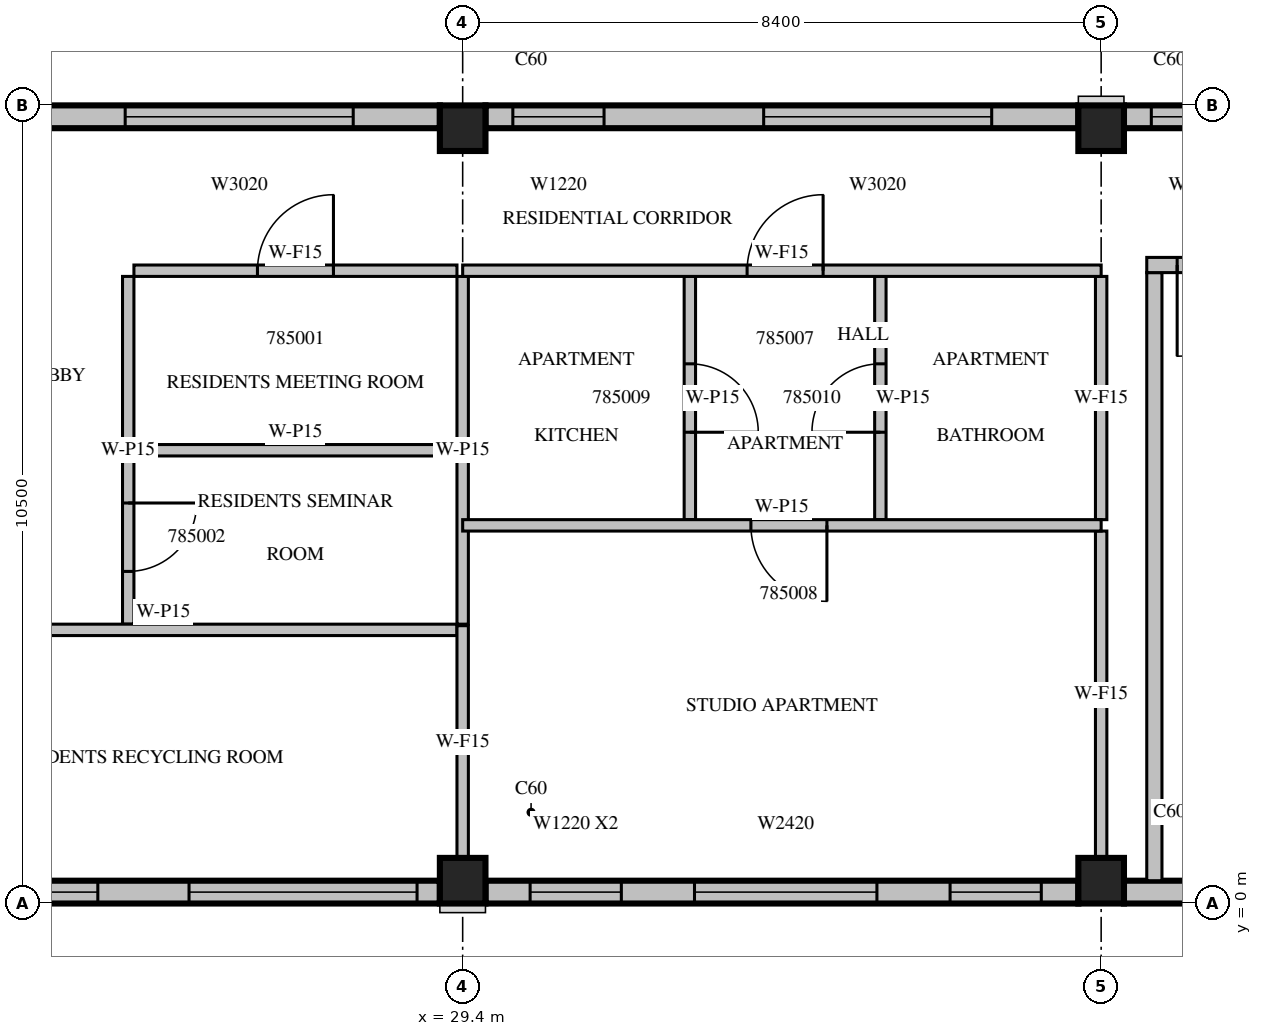
"""IFC4 building model, lengths in metres.
Left out: names, types, materials, properties, quantities, classifications, styles, units other than length and angle.
Written with IfcOpenShell. Run it as: python <this file> out.ifc"""

import sys

from ifc_helpers import new_model, si_unit, direction, frame, frame_2d, origin, origin_2d, place, context, subcontext, project, spatial, rectangle, extrude, source, transform, mapped, element, fill, save


model = new_model("IFC4")
c1 = context("Model", 3, precision=1e-05, world=origin(), true_north=direction((0.0, 1.0)))
c2 = subcontext(c1, "Body", "Model", "MODEL_VIEW")
j1 = project(units=[si_unit("LENGTHUNIT", "METRE"), si_unit("PLANEANGLEUNIT", "RADIAN")], contexts=[c1])
p1 = place(None, origin())
s1 = spatial("IfcSite", under=j1, at=p1, CompositionType="ELEMENT")
p2 = place(p1, origin())
s2 = spatial("IfcBuilding", under=s1, at=p2, CompositionType="ELEMENT")
p3 = place(p2, frame((0.0, 0.0, 358.0)))
s3 = spatial("IfcBuildingStorey", under=s2, at=p3, CompositionType="ELEMENT", Elevation=358.0)
m1 = source(origin(), c2, "Body", "SweptSolid", [
    extrude(rectangle(XDim=0.6, YDim=0.6, at=origin_2d()), origin(), (0.0, 0.0, 1.0), 3.5),
])
for number, where, z_axis, x_axis in (
    (1, (29.4, 0.3, 0.0), (0.0, 0.0, 1.0), (1.0, 0.0, 0.0)),
    (2, (37.8, 0.3, 0.0), (0.0, 0.0, 1.0), (1.0, 0.0, 0.0)),
    (3, (29.4, 10.2, 0.0), (0.0, 0.0, 1.0), (1.0, 0.0, 0.0)),
    (4, (37.8, 10.2, 0.0), (0.0, 0.0, 1.0), (1.0, 0.0, 0.0)),
):
    element("IfcColumn", number, at=place(p3, frame(where, z_axis=z_axis, x_axis=x_axis)), inside=s3, PredefinedType="COLUMN", context=c2, shape_type="MappedRepresentation", body=[
        mapped(m1, transform((0.0, 0.0, 0.0), scale=1.0)),
    ])
m2 = source(origin(), c2, "Body", "SweptSolid", [
    extrude(rectangle(XDim=7.8, YDim=0.3, at=frame_2d((3.9, 0.0))), origin(), (0.0, 0.0, 1.0), 3.1),
])
p4 = place(p3, frame((21.3, 0.15, 0.0), z_axis=(0.0, 0.0, 1.0), x_axis=(1.0, 0.0, 0.0)))
e5 = element("IfcWall", 5, at=p4, inside=s3, PredefinedType="STANDARD", context=c2, shape_type="MappedRepresentation", body=[
    mapped(m2, transform((0.0, 0.0, 0.0), scale=1.0)),
])
m3 = source(origin(), c2, "Body", "SweptSolid", [
    extrude(rectangle(XDim=3.0, YDim=2.0, at=frame_2d((1.5, 1.0))), frame((0.0, 0.16, 0.0), z_axis=(0.0, -1.0, 0.0), x_axis=(1.0, 0.0, 0.0)), (0.0, 0.0, 1.0), 0.32),
])
p5 = place(p4, frame((0.3, 0.0, 0.6)))
e6 = element("IfcOpeningElement", 6, at=p5, cuts=e5, PredefinedType="OPENING", context=c2, shape_type="MappedRepresentation", body=[
    mapped(m3, transform((0.0, 0.0, 0.0), scale=1.0)),
])
p6 = place(p4, frame((4.5, 0.0, 0.6)))
e7 = element("IfcOpeningElement", 7, at=p6, cuts=e5, PredefinedType="OPENING", context=c2, shape_type="MappedRepresentation", body=[
    mapped(m3, transform((0.0, 0.0, 0.0), scale=1.0)),
])
p7 = place(p3, frame((29.7, 0.15, 0.0), z_axis=(0.0, 0.0, 1.0), x_axis=(1.0, 0.0, 0.0)))
e8 = element("IfcWall", 8, at=p7, inside=s3, PredefinedType="STANDARD", context=c2, shape_type="MappedRepresentation", body=[
    mapped(m2, transform((0.0, 0.0, 0.0), scale=1.0)),
])
m4 = source(origin(), c2, "Body", "SweptSolid", [
    extrude(rectangle(XDim=1.2, YDim=2.0, at=frame_2d((0.6, 1.0))), frame((0.0, 0.16, 0.0), z_axis=(0.0, -1.0, 0.0), x_axis=(1.0, 0.0, 0.0)), (0.0, 0.0, 1.0), 0.32),
])
p8 = place(p7, frame((0.588, 0.0, 0.6)))
e9 = element("IfcOpeningElement", 9, at=p8, cuts=e8, PredefinedType="OPENING", context=c2, shape_type="MappedRepresentation", body=[
    mapped(m4, transform((0.0, 0.0, 0.0), scale=1.0)),
])
p9 = place(p7, frame((6.112, 0.0, 0.6)))
e10 = element("IfcOpeningElement", 10, at=p9, cuts=e8, PredefinedType="OPENING", context=c2, shape_type="MappedRepresentation", body=[
    mapped(m4, transform((0.0, 0.0, 0.0), scale=1.0)),
])
m5 = source(origin(), c2, "Body", "SweptSolid", [
    extrude(rectangle(XDim=2.4, YDim=2.0, at=frame_2d((1.2, 1.0))), frame((0.0, 0.16, 0.0), z_axis=(0.0, -1.0, 0.0), x_axis=(1.0, 0.0, 0.0)), (0.0, 0.0, 1.0), 0.32),
])
p10 = place(p7, frame((2.75, 0.0, 0.6)))
e11 = element("IfcOpeningElement", 11, at=p10, cuts=e8, PredefinedType="OPENING", context=c2, shape_type="MappedRepresentation", body=[
    mapped(m5, transform((0.0, 0.0, 0.0), scale=1.0)),
])
m6 = source(origin(), c2, "Body", "SweptSolid", [
    extrude(rectangle(XDim=2.1, YDim=0.3, at=frame_2d((1.05, 0.0))), origin(), (0.0, 0.0, 1.0), 3.1),
])
p11 = place(p3, frame((38.1, 0.15, 0.0), z_axis=(0.0, 0.0, 1.0), x_axis=(1.0, 0.0, 0.0)))
e12 = element("IfcWall", 12, at=p11, inside=s3, PredefinedType="STANDARD", context=c2, shape_type="MappedRepresentation", body=[
    mapped(m6, transform((0.0, 0.0, 0.0), scale=1.0)),
])
p12 = place(p3, frame((45.9, 10.35, 0.0), z_axis=(0.0, 0.0, 1.0), x_axis=(-1.0, 0.0, 0.0)))
e13 = element("IfcWall", 13, at=p12, inside=s3, PredefinedType="STANDARD", context=c2, shape_type="MappedRepresentation", body=[
    mapped(m2, transform((0.0, 0.0, 0.0), scale=1.0)),
])
p13 = place(p12, frame((1.14, 0.0, 0.6)))
e14 = element("IfcOpeningElement", 14, at=p13, cuts=e13, PredefinedType="OPENING", context=c2, shape_type="MappedRepresentation", body=[
    mapped(m3, transform((0.0, 0.0, 0.0), scale=1.0)),
])
p14 = place(p12, frame((6.24, 0.0, 0.6)))
e15 = element("IfcOpeningElement", 15, at=p14, cuts=e13, PredefinedType="OPENING", context=c2, shape_type="MappedRepresentation", body=[
    mapped(m4, transform((0.0, 0.0, 0.0), scale=1.0)),
])
p15 = place(p3, frame((37.5, 10.35, 0.0), z_axis=(0.0, 0.0, 1.0), x_axis=(-1.0, 0.0, 0.0)))
e16 = element("IfcWall", 16, at=p15, inside=s3, PredefinedType="STANDARD", context=c2, shape_type="MappedRepresentation", body=[
    mapped(m2, transform((0.0, 0.0, 0.0), scale=1.0)),
])
p16 = place(p15, frame((1.14, 0.0, 0.6)))
e17 = element("IfcOpeningElement", 17, at=p16, cuts=e16, PredefinedType="OPENING", context=c2, shape_type="MappedRepresentation", body=[
    mapped(m3, transform((0.0, 0.0, 0.0), scale=1.0)),
])
p17 = place(p15, frame((6.24, 0.0, 0.6)))
e18 = element("IfcOpeningElement", 18, at=p17, cuts=e16, PredefinedType="OPENING", context=c2, shape_type="MappedRepresentation", body=[
    mapped(m4, transform((0.0, 0.0, 0.0), scale=1.0)),
])
m7 = source(origin(), c2, "Body", "SweptSolid", [
    extrude(rectangle(XDim=7.5, YDim=0.3, at=frame_2d((3.75, 0.0))), origin(), (0.0, 0.0, 1.0), 3.1),
])
p18 = place(p3, frame((29.1, 10.35, 0.0), z_axis=(0.0, 0.0, 1.0), x_axis=(-1.0, 0.0, 0.0)))
e19 = element("IfcWall", 19, at=p18, inside=s3, PredefinedType="STANDARD", context=c2, shape_type="MappedRepresentation", body=[
    mapped(m7, transform((0.0, 0.0, 0.0), scale=1.0)),
])
p19 = place(p18, frame((1.14, 0.0, 0.6)))
e20 = element("IfcOpeningElement", 20, at=p19, cuts=e19, PredefinedType="OPENING", context=c2, shape_type="MappedRepresentation", body=[
    mapped(m3, transform((0.0, 0.0, 0.0), scale=1.0)),
])
m8 = source(origin(), c2, "Body", "SweptSolid", [
    extrude(rectangle(XDim=1.8, YDim=2.0, at=frame_2d((0.9, 1.0))), frame((0.0, 0.16, 0.0), z_axis=(0.0, -1.0, 0.0), x_axis=(1.0, 0.0, 0.0)), (0.0, 0.0, 1.0), 0.32),
])
p20 = place(p18, frame((5.52, 0.0, 0.6)))
e21 = element("IfcOpeningElement", 21, at=p20, cuts=e19, PredefinedType="OPENING", context=c2, shape_type="MappedRepresentation", body=[
    mapped(m8, transform((0.0, 0.0, 0.0), scale=1.0)),
])
m9 = source(origin(), c2, "Body", "SweptSolid", [
    extrude(rectangle(XDim=8.0, YDim=0.2, at=frame_2d((4.0, 0.0))), origin(), (0.0, 0.0, 1.0), 3.1),
])
p21 = place(p3, frame((38.5, 0.3, 0.0), z_axis=(0.0, 0.0, 1.0), x_axis=(0.0, 1.0, 0.0)))
e22 = element("IfcWall", 22, at=p21, inside=s3, PredefinedType="PARTITIONING", context=c2, shape_type="MappedRepresentation", body=[
    mapped(m9, transform((0.0, 0.0, 0.0), scale=1.0)),
])
m10 = source(origin(), c2, "Body", "SweptSolid", [
    extrude(rectangle(XDim=5.45, YDim=0.2, at=frame_2d((2.725, 0.0))), origin(), (0.0, 0.0, 1.0), 3.1),
])
p22 = place(p3, frame((38.4, 8.4, 0.0), z_axis=(0.0, 0.0, 1.0), x_axis=(1.0, 0.0, 0.0)))
e23 = element("IfcWall", 23, at=p22, inside=s3, PredefinedType="PARTITIONING", context=c2, shape_type="MappedRepresentation", body=[
    mapped(m10, transform((0.0, 0.0, 0.0), scale=1.0)),
])
m11 = source(origin(), c2, "Body", "SweptSolid", [
    extrude(rectangle(XDim=1.2, YDim=2.1, at=frame_2d((0.6, 1.05))), frame((0.0, 0.11, 0.0), z_axis=(0.0, -1.0, 0.0), x_axis=(1.0, 0.0, 0.0)), (0.0, 0.0, 1.0), 0.22),
])
p23 = place(p22, frame((0.4, 0.0, 0.0)))
e24 = element("IfcOpeningElement", 24, at=p23, cuts=e23, PredefinedType="OPENING", context=c2, shape_type="MappedRepresentation", body=[
    mapped(m11, transform((0.0, 0.0, 0.0), scale=1.0)),
])
m12 = source(origin(), c2, "Body", "SweptSolid", [
    extrude(rectangle(XDim=0.9, YDim=2.1, at=frame_2d((0.45, 1.05))), frame((0.0, 0.11, 0.0), z_axis=(0.0, -1.0, 0.0), x_axis=(1.0, 0.0, 0.0)), (0.0, 0.0, 1.0), 0.22),
])
p24 = place(p22, frame((3.25, 0.0, 0.0)))
e25 = element("IfcOpeningElement", 25, at=p24, cuts=e23, PredefinedType="OPENING", context=c2, shape_type="MappedRepresentation", body=[
    mapped(m12, transform((0.0, 0.0, 0.0), scale=1.0)),
])
m13 = source(origin(), c2, "Body", "SweptSolid", [
    extrude(rectangle(XDim=4.575, YDim=0.15, at=frame_2d((2.288, 0.0))), origin(), (0.0, 0.0, 1.0), 3.1),
])
p25 = place(p3, frame((25.0, 8.25, 0.0), z_axis=(0.0, 0.0, 1.0), x_axis=(0.0, -1.0, 0.0)))
e26 = element("IfcWall", 26, at=p25, inside=s3, PredefinedType="PARTITIONING", context=c2, shape_type="MappedRepresentation", body=[
    mapped(m13, transform((0.0, 0.0, 0.0), scale=1.0)),
])
m14 = source(origin(), c2, "Body", "SweptSolid", [
    extrude(rectangle(XDim=0.9, YDim=2.1, at=frame_2d((0.45, 1.05))), frame((0.0, 0.085, 0.0), z_axis=(0.0, -1.0, 0.0), x_axis=(1.0, 0.0, 0.0)), (0.0, 0.0, 1.0), 0.17),
])
p26 = place(p25, frame((2.981, 0.0, 0.0)))
e27 = element("IfcOpeningElement", 27, at=p26, cuts=e26, PredefinedType="OPENING", context=c2, shape_type="MappedRepresentation", body=[
    mapped(m14, transform((0.0, 0.0, 0.0), scale=1.0)),
])
p27 = place(p3, frame((29.4, 3.675, 0.0), z_axis=(0.0, 0.0, 1.0), x_axis=(0.0, 1.0, 0.0)))
e28 = element("IfcWall", 28, at=p27, inside=s3, PredefinedType="PARTITIONING", context=c2, shape_type="MappedRepresentation", body=[
    mapped(m13, transform((0.0, 0.0, 0.0), scale=1.0)),
])
m15 = source(origin(), c2, "Body", "SweptSolid", [
    extrude(rectangle(XDim=4.25, YDim=0.15, at=frame_2d((2.125, 0.0))), origin(), (0.0, 0.0, 1.0), 3.1),
])
p28 = place(p3, frame((29.325, 8.325, 0.0), z_axis=(0.0, 0.0, 1.0), x_axis=(-1.0, 0.0, 0.0)))
e29 = element("IfcWall", 29, at=p28, inside=s3, PredefinedType="PARTITIONING", context=c2, shape_type="MappedRepresentation", body=[
    mapped(m15, transform((0.0, 0.0, 0.0), scale=1.0)),
])
m16 = source(origin(), c2, "Body", "SweptSolid", [
    extrude(rectangle(XDim=1.0, YDim=2.1, at=frame_2d((0.5, 1.05))), frame((0.0, 0.085, 0.0), z_axis=(0.0, -1.0, 0.0), x_axis=(1.0, 0.0, 0.0)), (0.0, 0.0, 1.0), 0.17),
])
p29 = place(p28, frame((1.625, 0.0, 0.0)))
e30 = element("IfcOpeningElement", 30, at=p29, cuts=e29, PredefinedType="OPENING", context=c2, shape_type="MappedRepresentation", body=[
    mapped(m16, transform((0.0, 0.0, 0.0), scale=1.0)),
])
p30 = place(p3, frame((29.325, 5.963, 0.0), z_axis=(0.0, 0.0, 1.0), x_axis=(-1.0, 0.0, 0.0)))
e31 = element("IfcWall", 31, at=p30, inside=s3, PredefinedType="PARTITIONING", context=c2, shape_type="MappedRepresentation", body=[
    mapped(m15, transform((0.0, 0.0, 0.0), scale=1.0)),
])
m17 = source(origin(), c2, "Body", "SweptSolid", [
    extrude(rectangle(XDim=7.725, YDim=0.15, at=frame_2d((3.862, 0.0))), origin(), (0.0, 0.0, 1.0), 3.1),
])
p31 = place(p3, frame((21.6, 3.6, 0.0), z_axis=(0.0, 0.0, 1.0), x_axis=(1.0, 0.0, 0.0)))
e32 = element("IfcWall", 32, at=p31, inside=s3, PredefinedType="PARTITIONING", context=c2, shape_type="MappedRepresentation", body=[
    mapped(m17, transform((0.0, 0.0, 0.0), scale=1.0)),
])
m18 = source(origin(), c2, "Body", "SweptSolid", [
    extrude(rectangle(XDim=1.2, YDim=2.1, at=frame_2d((0.6, 1.05))), frame((0.0, 0.085, 0.0), z_axis=(0.0, -1.0, 0.0), x_axis=(1.0, 0.0, 0.0)), (0.0, 0.0, 1.0), 0.17),
])
p32 = place(p31, frame((1.1, 0.0, 0.0)))
e33 = element("IfcOpeningElement", 33, at=p32, cuts=e32, PredefinedType="OPENING", context=c2, shape_type="MappedRepresentation", body=[
    mapped(m18, transform((0.0, 0.0, 0.0), scale=1.0)),
])
m19 = source(origin(), c2, "Body", "SweptSolid", [
    extrude(rectangle(XDim=3.2, YDim=0.15, at=frame_2d((1.6, 0.0))), origin(), (0.0, 0.0, 1.0), 3.1),
])
p33 = place(p3, frame((32.389, 5.05, 0.0), z_axis=(0.0, 0.0, 1.0), x_axis=(0.0, 1.0, 0.0)))
e34 = element("IfcWall", 34, at=p33, inside=s3, PredefinedType="PARTITIONING", context=c2, shape_type="MappedRepresentation", body=[
    mapped(m19, transform((0.0, 0.0, 0.0), scale=1.0)),
])
p34 = place(p33, frame((1.15, 0.0, 0.0)))
e35 = element("IfcOpeningElement", 35, at=p34, cuts=e34, PredefinedType="OPENING", context=c2, shape_type="MappedRepresentation", body=[
    mapped(m14, transform((0.0, 0.0, 0.0), scale=1.0)),
])
p35 = place(p3, frame((34.895, 5.05, 0.0), z_axis=(0.0, 0.0, 1.0), x_axis=(0.0, 1.0, 0.0)))
e36 = element("IfcWall", 36, at=p35, inside=s3, PredefinedType="PARTITIONING", context=c2, shape_type="MappedRepresentation", body=[
    mapped(m19, transform((0.0, 0.0, 0.0), scale=1.0)),
])
p36 = place(p35, frame((1.15, 0.0, 0.0)))
e37 = element("IfcOpeningElement", 37, at=p36, cuts=e36, PredefinedType="OPENING", context=c2, shape_type="MappedRepresentation", body=[
    mapped(m14, transform((0.0, 0.0, 0.0), scale=1.0)),
])
m20 = source(origin(), c2, "Body", "SweptSolid", [
    extrude(rectangle(XDim=3.056, YDim=0.15, at=frame_2d((1.528, 0.0))), origin(), (0.0, 0.0, 1.0), 3.1),
])
p37 = place(p3, frame((29.4, 0.599, 0.0), z_axis=(0.0, 0.0, 1.0), x_axis=(0.0, 1.0, 0.0)))
e38 = element("IfcWall", 38, at=p37, inside=s3, PredefinedType="PARTITIONING", context=c2, shape_type="MappedRepresentation", body=[
    mapped(m20, transform((0.0, 0.0, 0.0), scale=1.0)),
])
m21 = source(origin(), c2, "Body", "SweptSolid", [
    extrude(rectangle(XDim=4.301, YDim=0.15, at=frame_2d((2.151, 0.0))), origin(), (0.0, 0.0, 1.0), 3.1),
])
p38 = place(p3, frame((37.8, 0.599, 0.0), z_axis=(0.0, 0.0, 1.0), x_axis=(0.0, 1.0, 0.0)))
e39 = element("IfcWall", 39, at=p38, inside=s3, PredefinedType="PARTITIONING", context=c2, shape_type="MappedRepresentation", body=[
    mapped(m21, transform((0.0, 0.0, 0.0), scale=1.0)),
])
p39 = place(p3, frame((37.8, 5.05, 0.0), z_axis=(0.0, 0.0, 1.0), x_axis=(0.0, 1.0, 0.0)))
e40 = element("IfcWall", 40, at=p39, inside=s3, PredefinedType="PARTITIONING", context=c2, shape_type="MappedRepresentation", body=[
    mapped(m19, transform((0.0, 0.0, 0.0), scale=1.0)),
])
m22 = source(origin(), c2, "Body", "SweptSolid", [
    extrude(rectangle(XDim=8.4, YDim=0.15, at=frame_2d((4.2, 0.0))), origin(), (0.0, 0.0, 1.0), 3.1),
])
p40 = place(p3, frame((37.8, 4.975, 0.0), z_axis=(0.0, 0.0, 1.0), x_axis=(-1.0, 0.0, 0.0)))
e41 = element("IfcWall", 41, at=p40, inside=s3, PredefinedType="PARTITIONING", context=c2, shape_type="MappedRepresentation", body=[
    mapped(m22, transform((0.0, 0.0, 0.0), scale=1.0)),
])
p41 = place(p40, frame((3.608, 0.0, 0.0)))
e42 = element("IfcOpeningElement", 42, at=p41, cuts=e41, PredefinedType="OPENING", context=c2, shape_type="MappedRepresentation", body=[
    mapped(m16, transform((0.0, 0.0, 0.0), scale=1.0)),
])
p42 = place(p3, frame((37.8, 8.325, 0.0), z_axis=(0.0, 0.0, 1.0), x_axis=(-1.0, 0.0, 0.0)))
e43 = element("IfcWall", 43, at=p42, inside=s3, PredefinedType="PARTITIONING", context=c2, shape_type="MappedRepresentation", body=[
    mapped(m22, transform((0.0, 0.0, 0.0), scale=1.0)),
])
p43 = place(p42, frame((3.658, 0.0, 0.0)))
e44 = element("IfcOpeningElement", 44, at=p43, cuts=e43, PredefinedType="OPENING", context=c2, shape_type="MappedRepresentation", body=[
    mapped(m16, transform((0.0, 0.0, 0.0), scale=1.0)),
])
m23 = source(origin(), c2, "Body", "SweptSolid", [
    extrude(rectangle(XDim=3.0, YDim=2.0, at=frame_2d((1.5, 1.0))), frame((0.0, 0.03, 0.0), z_axis=(0.0, -1.0, 0.0), x_axis=(1.0, 0.0, 0.0)), (0.0, 0.0, 1.0), 0.06),
])
p44 = place(p5, origin())
e45 = element("IfcWindow", 45, at=p44, inside=s3, PartitioningType="SINGLE_PANEL", PredefinedType="WINDOW", context=c2, shape_type="MappedRepresentation", body=[
    mapped(m23, transform((0.0, 0.0, 0.0), scale=1.0)),
])
fill(e6, e45)
p45 = place(p6, origin())
e46 = element("IfcWindow", 46, at=p45, inside=s3, PartitioningType="SINGLE_PANEL", PredefinedType="WINDOW", context=c2, shape_type="MappedRepresentation", body=[
    mapped(m23, transform((0.0, 0.0, 0.0), scale=1.0)),
])
fill(e7, e46)
m24 = source(origin(), c2, "Body", "SweptSolid", [
    extrude(rectangle(XDim=1.2, YDim=2.0, at=frame_2d((0.6, 1.0))), frame((0.0, 0.03, 0.0), z_axis=(0.0, -1.0, 0.0), x_axis=(1.0, 0.0, 0.0)), (0.0, 0.0, 1.0), 0.06),
])
p46 = place(p8, origin())
e47 = element("IfcWindow", 47, at=p46, inside=s3, PartitioningType="SINGLE_PANEL", PredefinedType="WINDOW", context=c2, shape_type="MappedRepresentation", body=[
    mapped(m24, transform((0.0, 0.0, 0.0), scale=1.0)),
])
fill(e9, e47)
p47 = place(p9, origin())
e48 = element("IfcWindow", 48, at=p47, inside=s3, PartitioningType="SINGLE_PANEL", PredefinedType="WINDOW", context=c2, shape_type="MappedRepresentation", body=[
    mapped(m24, transform((0.0, 0.0, 0.0), scale=1.0)),
])
fill(e10, e48)
m25 = source(origin(), c2, "Body", "SweptSolid", [
    extrude(rectangle(XDim=2.4, YDim=2.0, at=frame_2d((1.2, 1.0))), frame((0.0, 0.03, 0.0), z_axis=(0.0, -1.0, 0.0), x_axis=(1.0, 0.0, 0.0)), (0.0, 0.0, 1.0), 0.06),
])
p48 = place(p10, origin())
e49 = element("IfcWindow", 49, at=p48, inside=s3, PartitioningType="SINGLE_PANEL", PredefinedType="WINDOW", context=c2, shape_type="MappedRepresentation", body=[
    mapped(m25, transform((0.0, 0.0, 0.0), scale=1.0)),
])
fill(e11, e49)
p49 = place(p14, origin())
e50 = element("IfcWindow", 50, at=p49, inside=s3, PartitioningType="SINGLE_PANEL", PredefinedType="WINDOW", context=c2, shape_type="MappedRepresentation", body=[
    mapped(m24, transform((0.0, 0.0, 0.0), scale=1.0)),
])
fill(e15, e50)
p50 = place(p16, origin())
e51 = element("IfcWindow", 51, at=p50, inside=s3, PartitioningType="SINGLE_PANEL", PredefinedType="WINDOW", context=c2, shape_type="MappedRepresentation", body=[
    mapped(m23, transform((0.0, 0.0, 0.0), scale=1.0)),
])
fill(e17, e51)
p51 = place(p17, origin())
e52 = element("IfcWindow", 52, at=p51, inside=s3, PartitioningType="SINGLE_PANEL", PredefinedType="WINDOW", context=c2, shape_type="MappedRepresentation", body=[
    mapped(m24, transform((0.0, 0.0, 0.0), scale=1.0)),
])
fill(e18, e52)
p52 = place(p19, origin())
e53 = element("IfcWindow", 53, at=p52, inside=s3, PartitioningType="SINGLE_PANEL", PredefinedType="WINDOW", context=c2, shape_type="MappedRepresentation", body=[
    mapped(m23, transform((0.0, 0.0, 0.0), scale=1.0)),
])
fill(e20, e53)
m26 = source(origin(), c2, "Body", "SweptSolid", [
    extrude(rectangle(XDim=1.2, YDim=2.1, at=frame_2d((0.6, 1.05))), frame((0.0, 0.025, 0.0), z_axis=(0.0, -1.0, 0.0), x_axis=(1.0, 0.0, 0.0)), (0.0, 0.0, 1.0), 0.05),
])
p53 = place(p23, origin())
e54 = element("IfcDoor", 54, at=p53, inside=s3, OperationType="SINGLE_SWING_RIGHT", PredefinedType="DOOR", context=c2, shape_type="MappedRepresentation", body=[
    mapped(m26, transform((0.0, 0.0, 0.0), scale=1.0)),
])
fill(e24, e54)
m27 = source(origin(), c2, "Body", "SweptSolid", [
    extrude(rectangle(XDim=1.0, YDim=2.1, at=frame_2d((0.5, 1.05))), frame((0.0, 0.025, 0.0), z_axis=(0.0, -1.0, 0.0), x_axis=(1.0, 0.0, 0.0)), (0.0, 0.0, 1.0), 0.05),
])
p54 = place(p29, origin())
e55 = element("IfcDoor", 55, at=p54, inside=s3, OperationType="SINGLE_SWING_RIGHT", PredefinedType="DOOR", context=c2, shape_type="MappedRepresentation", body=[
    mapped(m27, transform((0.0, 0.0, 0.0), scale=1.0)),
])
fill(e30, e55)
m28 = source(origin(), c2, "Body", "SweptSolid", [
    extrude(rectangle(XDim=0.9, YDim=2.1, at=frame_2d((0.45, 1.05))), frame((0.0, 0.025, 0.0), z_axis=(0.0, -1.0, 0.0), x_axis=(1.0, 0.0, 0.0)), (0.0, 0.0, 1.0), 0.05),
])
p55 = place(p26, origin())
e56 = element("IfcDoor", 56, at=p55, inside=s3, OperationType="SINGLE_SWING_LEFT", PredefinedType="DOOR", context=c2, shape_type="MappedRepresentation", body=[
    mapped(m28, transform((0.0, 0.0, 0.0), scale=1.0)),
])
fill(e27, e56)
p56 = place(p43, origin())
e57 = element("IfcDoor", 57, at=p56, inside=s3, OperationType="SINGLE_SWING_RIGHT", PredefinedType="DOOR", context=c2, shape_type="MappedRepresentation", body=[
    mapped(m27, transform((0.0, 0.0, 0.0), scale=1.0)),
])
fill(e44, e57)
p57 = place(p41, origin())
e58 = element("IfcDoor", 58, at=p57, inside=s3, OperationType="SINGLE_SWING_LEFT", PredefinedType="DOOR", context=c2, shape_type="MappedRepresentation", body=[
    mapped(m27, transform((0.0, 0.0, 0.0), scale=1.0)),
])
fill(e42, e58)
p58 = place(p34, origin())
e59 = element("IfcDoor", 59, at=p58, inside=s3, OperationType="SINGLE_SWING_RIGHT", PredefinedType="DOOR", context=c2, shape_type="MappedRepresentation", body=[
    mapped(m28, transform((0.0, 0.0, 0.0), scale=1.0)),
])
fill(e35, e59)
p59 = place(p36, origin())
e60 = element("IfcDoor", 60, at=p59, inside=s3, OperationType="SINGLE_SWING_LEFT", PredefinedType="DOOR", context=c2, shape_type="MappedRepresentation", body=[
    mapped(m28, transform((0.0, 0.0, 0.0), scale=1.0)),
])
fill(e37, e60)
save(model, sys.argv[1])
